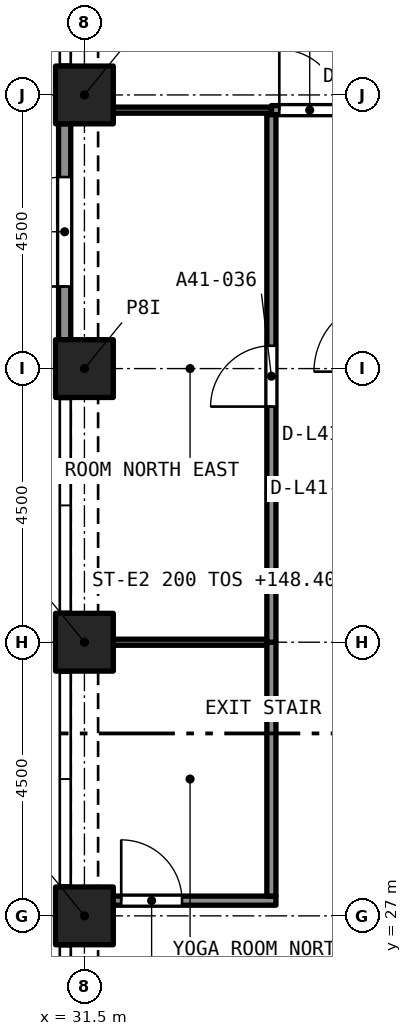
"""IFC4 building model, lengths in metres.
Left out: names, types, materials, properties, quantities, classifications, styles, units other than length and angle.
Written with IfcOpenShell. Run it as: python <this file> out.ifc"""

import sys

from ifc_helpers import new_model, si_unit, direction, frame, frame_2d, origin, origin_2d, place, context, subcontext, project, spatial, rectangle, extrude, element, fill, save


model = new_model("IFC4")
c1 = context("Model", 3, precision=1e-05, world=origin(), true_north=direction((0.0, 1.0)))
c2 = subcontext(c1, "Body", "Model", "MODEL_VIEW")
j1 = project(units=[si_unit("LENGTHUNIT", "METRE"), si_unit("PLANEANGLEUNIT", "RADIAN")], contexts=[c1])
p1 = place(None, origin())
s1 = spatial("IfcSite", under=j1, at=p1, CompositionType="ELEMENT")
p2 = place(p1, origin())
s2 = spatial("IfcBuilding", under=s1, at=p2, CompositionType="ELEMENT")
p3 = place(p2, frame((0.0, 0.0, 146.2)))
s3 = spatial("IfcBuildingStorey", under=s2, at=p3, CompositionType="ELEMENT", Elevation=146.2)
for number, where, z_axis, x_axis in (
    (1, (31.5, 27.0, 0.0), (0.0, 0.0, 1.0), (1.0, 0.0, 0.0)),
    (2, (31.5, 31.5, 0.0), (0.0, 0.0, 1.0), (1.0, 0.0, 0.0)),
    (3, (31.5, 36.0, 0.0), (0.0, 0.0, 1.0), (1.0, 0.0, 0.0)),
    (4, (31.5, 40.5, 0.0), (0.0, 0.0, 1.0), (1.0, 0.0, 0.0)),
):
    element("IfcColumn", number, at=place(p3, frame(where, z_axis=z_axis, x_axis=x_axis)), inside=s3, PredefinedType="COLUMN", context=c2, shape_type="SweptSolid", body=[
        extrude(rectangle(XDim=0.95, YDim=0.95, at=origin_2d()), origin(), (0.0, 0.0, 1.0), 4.4),
    ])
p4 = place(p3, frame((31.175, 36.475, 0.0), z_axis=(0.0, 0.0, 1.0), x_axis=(0.0, 1.0, 0.0)))
e5 = element("IfcWall", 5, at=p4, inside=s3, PredefinedType="SOLIDWALL", context=c2, shape_type="SweptSolid", body=[
    extrude(rectangle(XDim=3.55, YDim=0.2, at=frame_2d((1.775, 0.0))), origin(), (0.0, 0.0, 1.0), 4.4),
])
p5 = place(p4, frame((0.875, 0.0, 0.0)))
e6 = element("IfcOpeningElement", 6, at=p5, cuts=e5, PredefinedType="OPENING", context=c2, shape_type="SweptSolid", body=[
    extrude(rectangle(XDim=1.8, YDim=2.4, at=frame_2d((0.9, 1.2))), frame((0.0, 0.11, 0.0), z_axis=(0.0, -1.0, 0.0), x_axis=(1.0, 0.0, 0.0)), (0.0, 0.0, 1.0), 0.22),
])
p6 = place(p3, frame((34.575, 40.25, 0.0), z_axis=(0.0, 0.0, 1.0), x_axis=(1.0, 0.0, 0.0)))
e7 = element("IfcWall", 7, at=p6, inside=s3, PredefinedType="PARTITIONING", context=c2, shape_type="SweptSolid", body=[
    extrude(rectangle(XDim=1.675, YDim=0.15, at=frame_2d((0.837, 0.0))), origin(), (0.0, 0.0, 1.0), 4.1),
])
p7 = place(p6, frame((0.13, 0.0, 0.0)))
e8 = element("IfcOpeningElement", 8, at=p7, cuts=e7, PredefinedType="OPENING", context=c2, shape_type="SweptSolid", body=[
    extrude(rectangle(XDim=1.0, YDim=2.1, at=frame_2d((0.5, 1.05))), frame((0.0, 0.085, 0.0), z_axis=(0.0, -1.0, 0.0), x_axis=(1.0, 0.0, 0.0)), (0.0, 0.0, 1.0), 0.17),
])
p8 = place(p3, frame((31.975, 40.25, 0.0), z_axis=(0.0, 0.0, 1.0), x_axis=(1.0, 0.0, 0.0)))
e9 = element("IfcWall", 9, at=p8, inside=s3, PredefinedType="PARTITIONING", context=c2, shape_type="SweptSolid", body=[
    extrude(rectangle(XDim=2.6, YDim=0.1, at=frame_2d((1.3, 0.0))), origin(), (0.0, 0.0, 1.0), 4.1),
])
p9 = place(p3, frame((31.975, 27.25, 0.0), z_axis=(0.0, 0.0, 1.0), x_axis=(1.0, 0.0, 0.0)))
e10 = element("IfcWall", 10, at=p9, inside=s3, PredefinedType="PARTITIONING", context=c2, shape_type="SweptSolid", body=[
    extrude(rectangle(XDim=2.675, YDim=0.15, at=frame_2d((1.337, 0.0))), origin(), (0.0, 0.0, 1.0), 4.1),
])
p10 = place(p9, frame((0.13, 0.0, 0.0)))
e11 = element("IfcOpeningElement", 11, at=p10, cuts=e10, PredefinedType="OPENING", context=c2, shape_type="SweptSolid", body=[
    extrude(rectangle(XDim=1.0, YDim=2.1, at=frame_2d((0.5, 1.05))), frame((0.0, 0.085, 0.0), z_axis=(0.0, -1.0, 0.0), x_axis=(1.0, 0.0, 0.0)), (0.0, 0.0, 1.0), 0.17),
])
p11 = place(p3, frame((34.575, 27.325, 0.0), z_axis=(0.0, 0.0, 1.0), x_axis=(0.0, 1.0, 0.0)))
e12 = element("IfcWall", 12, at=p11, inside=s3, PredefinedType="PARTITIONING", context=c2, shape_type="SweptSolid", body=[
    extrude(rectangle(XDim=4.175, YDim=0.15, at=frame_2d((2.087, 0.0))), origin(), (0.0, 0.0, 1.0), 4.1),
])
p12 = place(p3, frame((34.575, 31.5, 0.0), z_axis=(0.0, 0.0, 1.0), x_axis=(0.0, 1.0, 0.0)))
e13 = element("IfcWall", 13, at=p12, inside=s3, PredefinedType="PARTITIONING", context=c2, shape_type="SweptSolid", body=[
    extrude(rectangle(XDim=8.675, YDim=0.15, at=frame_2d((4.337, 0.0))), origin(), (0.0, 0.0, 1.0), 4.1),
])
p13 = place(p12, frame((3.875, 0.0, 0.0)))
e14 = element("IfcOpeningElement", 14, at=p13, cuts=e13, PredefinedType="OPENING", context=c2, shape_type="SweptSolid", body=[
    extrude(rectangle(XDim=1.0, YDim=2.1, at=frame_2d((0.5, 1.05))), frame((0.0, 0.085, 0.0), z_axis=(0.0, -1.0, 0.0), x_axis=(1.0, 0.0, 0.0)), (0.0, 0.0, 1.0), 0.17),
])
p14 = place(p3, frame((31.975, 31.5, 0.0), z_axis=(0.0, 0.0, 1.0), x_axis=(1.0, 0.0, 0.0)))
e15 = element("IfcWall", 15, at=p14, inside=s3, PredefinedType="PARTITIONING", context=c2, shape_type="SweptSolid", body=[
    extrude(rectangle(XDim=2.525, YDim=0.1, at=frame_2d((1.262, 0.0))), origin(), (0.0, 0.0, 1.0), 4.1),
])
p15 = place(p5, origin())
e16 = element("IfcDoor", 16, at=p15, inside=s3, OperationType="DOUBLE_DOOR_SINGLE_SWING", PredefinedType="DOOR", context=c2, shape_type="SweptSolid", body=[
    extrude(rectangle(XDim=1.8, YDim=2.4, at=frame_2d((0.9, 1.2))), frame((0.0, 0.025, 0.0), z_axis=(0.0, -1.0, 0.0), x_axis=(1.0, 0.0, 0.0)), (0.0, 0.0, 1.0), 0.05),
])
fill(e6, e16)
p16 = place(p7, origin())
e17 = element("IfcDoor", 17, at=p16, inside=s3, OperationType="SINGLE_SWING_LEFT", PredefinedType="DOOR", context=c2, shape_type="SweptSolid", body=[
    extrude(rectangle(XDim=1.0, YDim=2.1, at=frame_2d((0.5, 1.05))), frame((0.0, 0.025, 0.0), z_axis=(0.0, -1.0, 0.0), x_axis=(1.0, 0.0, 0.0)), (0.0, 0.0, 1.0), 0.05),
])
fill(e8, e17)
p17 = place(p10, origin())
e18 = element("IfcDoor", 18, at=p17, inside=s3, OperationType="SINGLE_SWING_LEFT", PredefinedType="DOOR", context=c2, shape_type="SweptSolid", body=[
    extrude(rectangle(XDim=1.0, YDim=2.1, at=frame_2d((0.5, 1.05))), frame((0.0, 0.025, 0.0), z_axis=(0.0, -1.0, 0.0), x_axis=(1.0, 0.0, 0.0)), (0.0, 0.0, 1.0), 0.05),
])
fill(e11, e18)
p18 = place(p13, origin())
e19 = element("IfcDoor", 19, at=p18, inside=s3, OperationType="SINGLE_SWING_RIGHT", PredefinedType="DOOR", context=c2, shape_type="SweptSolid", body=[
    extrude(rectangle(XDim=1.0, YDim=2.1, at=frame_2d((0.5, 1.05))), frame((0.0, 0.025, 0.0), z_axis=(0.0, -1.0, 0.0), x_axis=(1.0, 0.0, 0.0)), (0.0, 0.0, 1.0), 0.05),
])
fill(e14, e19)
save(model, sys.argv[1])
